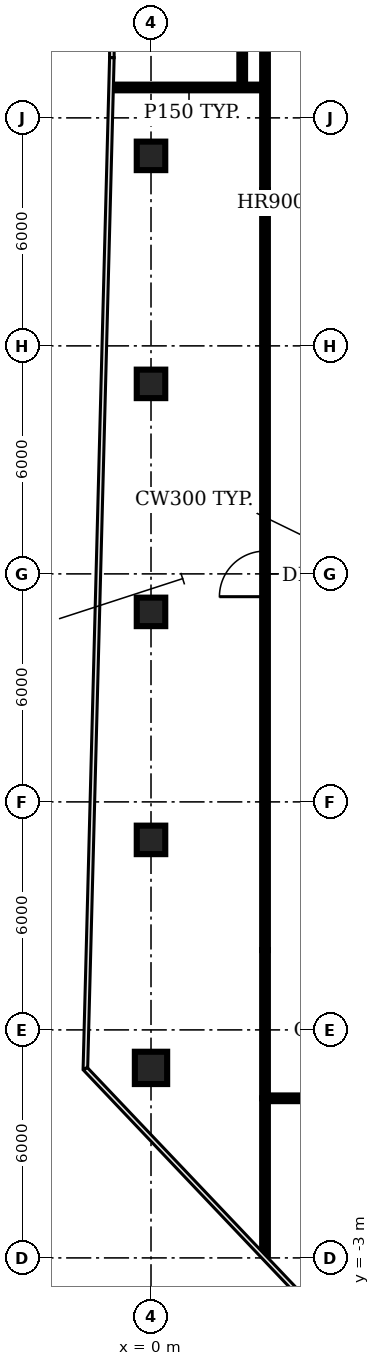
"""IFC4 building model, lengths in metres.
Left out: names, types, materials, properties, quantities, classifications, styles, units other than length and angle.
Written with IfcOpenShell. Run it as: python <this file> out.ifc"""

import sys

from ifc_helpers import new_model, si_unit, direction, frame, frame_2d, origin, origin_2d, place, context, subcontext, project, spatial, rectangle, circle, extrude, element, fill, save


model = new_model("IFC4")
c1 = context("Model", 3, precision=1e-05, world=origin(), true_north=direction((0.0, 1.0)))
c2 = subcontext(c1, "Body", "Model", "MODEL_VIEW")
j1 = project(units=[si_unit("LENGTHUNIT", "METRE"), si_unit("PLANEANGLEUNIT", "RADIAN")], contexts=[c1])
p1 = place(None, origin())
s1 = spatial("IfcSite", under=j1, at=p1, CompositionType="ELEMENT")
p2 = place(p1, origin())
s2 = spatial("IfcBuilding", under=s1, at=p2, CompositionType="ELEMENT")
p3 = place(p2, frame((0.0, 0.0, 281.0)))
s3 = spatial("IfcBuildingStorey", under=s2, at=p3, CompositionType="ELEMENT", Elevation=281.0)
p4 = place(p3, frame((0.0, 2.0, 0.0), z_axis=(0.0, 0.0, 1.0), x_axis=(1.0, 0.0, 0.0)))
e1 = element("IfcColumn", 1, at=p4, inside=s3, PredefinedType="COLUMN", context=c2, shape_type="SweptSolid", body=[
    extrude(circle(Radius=0.425, at=origin_2d()), origin(), (0.0, 0.0, 1.0), 3.85),
])
for number, where, z_axis, x_axis in (
    (2, (0.0, 8.0, 0.0), (0.0, 0.0, 1.0), (1.0, 0.0, 0.0)),
    (3, (0.0, 14.0, 0.0), (0.0, 0.0, 1.0), (1.0, 0.0, 0.0)),
    (4, (0.0, 20.0, 0.0), (0.0, 0.0, 1.0), (1.0, 0.0, 0.0)),
    (5, (0.0, 26.0, 0.0), (0.0, 0.0, 1.0), (1.0, 0.0, 0.0)),
):
    element("IfcColumn", number, at=place(p3, frame(where, z_axis=z_axis, x_axis=x_axis)), inside=s3, PredefinedType="COLUMN", context=c2, shape_type="SweptSolid", body=[
        extrude(rectangle(XDim=0.75, YDim=0.75, at=origin_2d()), origin(), (0.0, 0.0, 1.0), 3.85),
    ])
p5 = place(p3, frame((-1.0, 27.8, 0.0), z_axis=(0.0, 0.0, 1.0), x_axis=(1.0, 0.0, 0.0)))
e6 = element("IfcWall", 6, at=p5, inside=s3, PredefinedType="PARTITIONING", context=c2, shape_type="SweptSolid", body=[
    extrude(rectangle(XDim=4.0, YDim=0.15, at=frame_2d((2.0, 0.0))), origin(), (0.0, 0.0, 1.0), 2.9),
])
p6 = place(p3, frame((2.4, 27.8, 0.0), z_axis=(0.0, 0.0, 1.0), x_axis=(0.0, 1.0, 0.0)))
e7 = element("IfcWall", 7, at=p6, inside=s3, PredefinedType="PARTITIONING", context=c2, shape_type="SweptSolid", body=[
    extrude(rectangle(XDim=6.0, YDim=0.15, at=frame_2d((3.0, 0.0))), origin(), (0.0, 0.0, 1.0), 2.9),
])
p7 = place(p3, frame((3.0, -2.93, 0.0), z_axis=(0.0, 0.0, 1.0), x_axis=(0.0, 1.0, 0.0)))
e8 = element("IfcWall", 8, at=p7, inside=s3, PredefinedType="PARTITIONING", context=c2, shape_type="SweptSolid", body=[
    extrude(rectangle(XDim=4.13, YDim=0.15, at=frame_2d((2.065, 0.0))), origin(), (0.0, 0.0, 1.0), 2.9),
])
p8 = place(p3, frame((3.0, 1.2, 0.0), z_axis=(0.0, 0.0, 1.0), x_axis=(0.0, 1.0, 0.0)))
e9 = element("IfcWall", 9, at=p8, inside=s3, PredefinedType="PARTITIONING", context=c2, shape_type="SweptSolid", body=[
    extrude(rectangle(XDim=3.9, YDim=0.15, at=frame_2d((1.95, 0.0))), origin(), (0.0, 0.0, 1.0), 2.9),
])
p9 = place(p3, frame((3.0, 5.1, 0.0), z_axis=(0.0, 0.0, 1.0), x_axis=(0.0, 1.0, 0.0)))
e10 = element("IfcWall", 10, at=p9, inside=s3, PredefinedType="PARTITIONING", context=c2, shape_type="SweptSolid", body=[
    extrude(rectangle(XDim=20.0, YDim=0.15, at=frame_2d((10.0, 0.0))), origin(), (0.0, 0.0, 1.0), 2.9),
])
p10 = place(p9, frame((9.3, 0.0, 0.0)))
e11 = element("IfcOpeningElement", 11, at=p10, cuts=e10, PredefinedType="OPENING", context=c2, shape_type="SweptSolid", body=[
    extrude(rectangle(XDim=1.2, YDim=2.1, at=frame_2d((0.6, 1.05))), frame((0.0, 0.085, 0.0), z_axis=(0.0, -1.0, 0.0), x_axis=(1.0, 0.0, 0.0)), (0.0, 0.0, 1.0), 0.17),
])
p11 = place(p3, frame((3.0, 25.1, 0.0), z_axis=(0.0, 0.0, 1.0), x_axis=(0.0, 1.0, 0.0)))
e12 = element("IfcWall", 12, at=p11, inside=s3, PredefinedType="PARTITIONING", context=c2, shape_type="SweptSolid", body=[
    extrude(rectangle(XDim=3.9, YDim=0.15, at=frame_2d((1.95, 0.0))), origin(), (0.0, 0.0, 1.0), 2.9),
])
p12 = place(p3, frame((27.0, 1.2, 0.0), z_axis=(0.0, 0.0, 1.0), x_axis=(-1.0, 0.0, 0.0)))
e13 = element("IfcWall", 13, at=p12, inside=s3, PredefinedType="PARTITIONING", context=c2, shape_type="SweptSolid", body=[
    extrude(rectangle(XDim=24.0, YDim=0.15, at=frame_2d((12.0, 0.0))), origin(), (0.0, 0.0, 1.0), 2.9),
])
p13 = place(p12, frame((11.5, 0.0, 0.0)))
e14 = element("IfcOpeningElement", 14, at=p13, cuts=e13, PredefinedType="OPENING", context=c2, shape_type="SweptSolid", body=[
    extrude(rectangle(XDim=1.2, YDim=2.1, at=frame_2d((0.6, 1.05))), frame((0.0, 0.085, 0.0), z_axis=(0.0, -1.0, 0.0), x_axis=(1.0, 0.0, 0.0)), (0.0, 0.0, 1.0), 0.17),
])
p14 = place(p10, origin())
e15 = element("IfcDoor", 15, at=p14, inside=s3, OperationType="SINGLE_SWING_LEFT", PredefinedType="DOOR", context=c2, shape_type="SweptSolid", body=[
    extrude(rectangle(XDim=1.2, YDim=2.1, at=frame_2d((0.6, 1.05))), frame((0.0, 0.025, 0.0), z_axis=(0.0, -1.0, 0.0), x_axis=(1.0, 0.0, 0.0)), (0.0, 0.0, 1.0), 0.05),
])
fill(e11, e15)
save(model, sys.argv[1])
